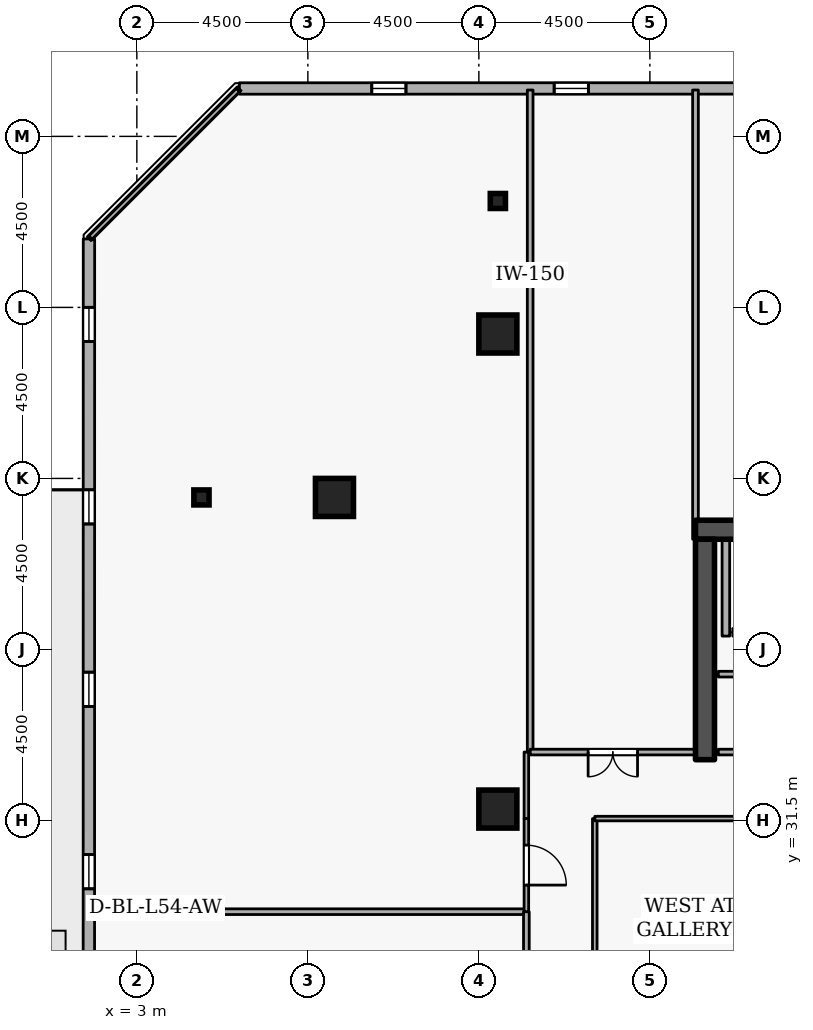
"""IFC4 building model, lengths in metres.
Left out: names, types, materials, properties, quantities, classifications, styles, units other than length and angle.
Written with IfcOpenShell. Run it as: python <this file> out.ifc"""

import sys

from ifc_helpers import new_model, si_unit, direction, frame, frame_2d, origin, origin_2d, place, context, subcontext, project, spatial, rectangle, i_section, extrude, element, fill, save


model = new_model("IFC4")
c1 = context("Model", 3, precision=1e-05, world=origin(), true_north=direction((0.0, 1.0)))
c2 = subcontext(c1, "Body", "Model", "MODEL_VIEW")
j1 = project(units=[si_unit("LENGTHUNIT", "METRE"), si_unit("PLANEANGLEUNIT", "RADIAN")], contexts=[c1])
p1 = place(None, origin())
s1 = spatial("IfcSite", under=j1, at=p1, CompositionType="ELEMENT")
p2 = place(p1, origin())
s2 = spatial("IfcBuilding", under=s1, at=p2, CompositionType="ELEMENT")
p3 = place(p2, frame((0.0, 0.0, 203.7)))
s3 = spatial("IfcBuildingStorey", under=s2, at=p3, CompositionType="ELEMENT", Elevation=203.7)
p4 = place(p3, frame((17.7, 39.15, 0.0), z_axis=(0.0, 0.0, 1.0), x_axis=(1.0, 0.0, 0.0)))
e1 = element("IfcWall", 1, at=p4, inside=s3, PredefinedType="SHEAR", context=c2, shape_type="SweptSolid", body=[
    extrude(rectangle(XDim=15.6, YDim=0.5, at=frame_2d((7.8, 0.0))), origin(), (0.0, 0.0, 1.0), 3.6),
])
p5 = place(p3, frame((17.95, 33.1, 0.0), z_axis=(0.0, 0.0, 1.0), x_axis=(0.0, 1.0, 0.0)))
e2 = element("IfcWall", 2, at=p5, inside=s3, PredefinedType="SHEAR", context=c2, shape_type="SweptSolid", body=[
    extrude(rectangle(XDim=5.8, YDim=0.5, at=frame_2d((2.9, 0.0))), origin(), (0.0, 0.0, 1.0), 3.6),
])
for number, where, z_axis, x_axis in (
    (3, (12.5, 44.3, 0.0), (0.0, 0.0, 1.0), (1.0, 0.0, 0.0)),
    (4, (8.2, 40.0, 0.0), (0.0, 0.0, 1.0), (1.0, 0.0, 0.0)),
    (5, (12.5, 31.8, 0.0), (0.0, 0.0, 1.0), (1.0, 0.0, 0.0)),
):
    element("IfcColumn", number, at=place(p3, frame(where, z_axis=z_axis, x_axis=x_axis)), inside=s3, PredefinedType="COLUMN", context=c2, shape_type="SweptSolid", body=[
        extrude(rectangle(XDim=1.0, YDim=1.0, at=origin_2d()), origin(), (0.0, 0.0, 1.0), 3.6),
    ])
for number, where, z_axis, x_axis in (
    (6, (12.5, 47.8, 0.0), (0.0, 0.0, 1.0), (1.0, 0.0, 0.0)),
    (7, (4.7, 40.0, 0.0), (0.0, 0.0, 1.0), (1.0, 0.0, 0.0)),
):
    element("IfcColumn", number, at=place(p3, frame(where, z_axis=z_axis, x_axis=x_axis)), inside=s3, PredefinedType="COLUMN", context=c2, shape_type="SweptSolid", body=[
        extrude(i_section(OverallWidth=0.399, OverallDepth=0.394, WebThickness=0.023, FlangeThickness=0.037, FilletRadius=0.015, at=origin_2d()), origin(), (0.0, 0.0, 1.0), 3.6),
    ])
p6 = place(p3, frame((40.681, 50.765, 0.0), z_axis=(0.0, 0.0, 1.0), x_axis=(-0.999999991209, -0.000132597301, 0.0)))
e8 = element("IfcWall", 8, at=p6, inside=s3, PredefinedType="STANDARD", context=c2, shape_type="SweptSolid", body=[
    extrude(rectangle(XDim=34.983, YDim=0.3, at=frame_2d((17.492, 0.0))), origin(), (0.0, 0.0, 1.0), 2.7),
])
p7 = place(p6, frame((1.8, 0.0, 0.72)))
e9 = element("IfcOpeningElement", 9, at=p7, cuts=e8, PredefinedType="OPENING", context=c2, shape_type="SweptSolid", body=[
    extrude(rectangle(XDim=0.9, YDim=1.75, at=frame_2d((0.45, 0.875))), frame((0.0, 0.16, 0.0), z_axis=(0.0, -1.0, 0.0), x_axis=(1.0, 0.0, 0.0)), (0.0, 0.0, 1.0), 0.32),
])
p8 = place(p6, frame((6.6, 0.0, 0.72)))
e10 = element("IfcOpeningElement", 10, at=p8, cuts=e8, PredefinedType="OPENING", context=c2, shape_type="SweptSolid", body=[
    extrude(rectangle(XDim=0.9, YDim=1.75, at=frame_2d((0.45, 0.875))), frame((0.0, 0.16, 0.0), z_axis=(0.0, -1.0, 0.0), x_axis=(1.0, 0.0, 0.0)), (0.0, 0.0, 1.0), 0.32),
])
p9 = place(p6, frame((11.4, 0.0, 0.72)))
e11 = element("IfcOpeningElement", 11, at=p9, cuts=e8, PredefinedType="OPENING", context=c2, shape_type="SweptSolid", body=[
    extrude(rectangle(XDim=0.9, YDim=1.75, at=frame_2d((0.45, 0.875))), frame((0.0, 0.16, 0.0), z_axis=(0.0, -1.0, 0.0), x_axis=(1.0, 0.0, 0.0)), (0.0, 0.0, 1.0), 0.32),
])
p10 = place(p6, frame((16.2, 0.0, 0.72)))
e12 = element("IfcOpeningElement", 12, at=p10, cuts=e8, PredefinedType="OPENING", context=c2, shape_type="SweptSolid", body=[
    extrude(rectangle(XDim=0.9, YDim=1.75, at=frame_2d((0.45, 0.875))), frame((0.0, 0.16, 0.0), z_axis=(0.0, -1.0, 0.0), x_axis=(1.0, 0.0, 0.0)), (0.0, 0.0, 1.0), 0.32),
])
p11 = place(p6, frame((21.0, 0.0, 0.72)))
e13 = element("IfcOpeningElement", 13, at=p11, cuts=e8, PredefinedType="OPENING", context=c2, shape_type="SweptSolid", body=[
    extrude(rectangle(XDim=0.9, YDim=1.75, at=frame_2d((0.45, 0.875))), frame((0.0, 0.16, 0.0), z_axis=(0.0, -1.0, 0.0), x_axis=(1.0, 0.0, 0.0)), (0.0, 0.0, 1.0), 0.32),
])
p12 = place(p6, frame((25.8, 0.0, 0.72)))
e14 = element("IfcOpeningElement", 14, at=p12, cuts=e8, PredefinedType="OPENING", context=c2, shape_type="SweptSolid", body=[
    extrude(rectangle(XDim=0.9, YDim=1.75, at=frame_2d((0.45, 0.875))), frame((0.0, 0.16, 0.0), z_axis=(0.0, -1.0, 0.0), x_axis=(1.0, 0.0, 0.0)), (0.0, 0.0, 1.0), 0.32),
])
p13 = place(p6, frame((30.6, 0.0, 0.72)))
e15 = element("IfcOpeningElement", 15, at=p13, cuts=e8, PredefinedType="OPENING", context=c2, shape_type="SweptSolid", body=[
    extrude(rectangle(XDim=0.9, YDim=1.75, at=frame_2d((0.45, 0.875))), frame((0.0, 0.16, 0.0), z_axis=(0.0, -1.0, 0.0), x_axis=(1.0, 0.0, 0.0)), (0.0, 0.0, 1.0), 0.32),
])
p14 = place(p3, frame((1.74, 46.802, 0.0), z_axis=(0.0, 0.0, 1.0), x_axis=(-0.000132597301, -0.999999991209, 0.0)))
e16 = element("IfcWall", 16, at=p14, inside=s3, PredefinedType="STANDARD", context=c2, shape_type="SweptSolid", body=[
    extrude(rectangle(XDim=34.983, YDim=0.3, at=frame_2d((17.492, 0.0))), origin(), (0.0, 0.0, 1.0), 2.7),
])
p15 = place(p14, frame((19.292, 0.0, 0.0)))
e17 = element("IfcOpeningElement", 17, at=p15, cuts=e16, PredefinedType="OPENING", context=c2, shape_type="SweptSolid", body=[
    extrude(rectangle(XDim=1.0, YDim=2.08, at=frame_2d((0.5, 1.04))), frame((0.0, 0.16, 0.0), z_axis=(0.0, -1.0, 0.0), x_axis=(1.0, 0.0, 0.0)), (0.0, 0.0, 1.0), 0.32),
])
p16 = place(p14, frame((1.8, 0.0, 0.72)))
e18 = element("IfcOpeningElement", 18, at=p16, cuts=e16, PredefinedType="OPENING", context=c2, shape_type="SweptSolid", body=[
    extrude(rectangle(XDim=0.9, YDim=1.75, at=frame_2d((0.45, 0.875))), frame((0.0, 0.16, 0.0), z_axis=(0.0, -1.0, 0.0), x_axis=(1.0, 0.0, 0.0)), (0.0, 0.0, 1.0), 0.32),
])
p17 = place(p14, frame((6.6, 0.0, 0.72)))
e19 = element("IfcOpeningElement", 19, at=p17, cuts=e16, PredefinedType="OPENING", context=c2, shape_type="SweptSolid", body=[
    extrude(rectangle(XDim=0.9, YDim=1.75, at=frame_2d((0.45, 0.875))), frame((0.0, 0.16, 0.0), z_axis=(0.0, -1.0, 0.0), x_axis=(1.0, 0.0, 0.0)), (0.0, 0.0, 1.0), 0.32),
])
p18 = place(p14, frame((11.4, 0.0, 0.72)))
e20 = element("IfcOpeningElement", 20, at=p18, cuts=e16, PredefinedType="OPENING", context=c2, shape_type="SweptSolid", body=[
    extrude(rectangle(XDim=0.9, YDim=1.75, at=frame_2d((0.45, 0.875))), frame((0.0, 0.16, 0.0), z_axis=(0.0, -1.0, 0.0), x_axis=(1.0, 0.0, 0.0)), (0.0, 0.0, 1.0), 0.32),
])
p19 = place(p14, frame((16.2, 0.0, 0.72)))
e21 = element("IfcOpeningElement", 21, at=p19, cuts=e16, PredefinedType="OPENING", context=c2, shape_type="SweptSolid", body=[
    extrude(rectangle(XDim=0.9, YDim=1.75, at=frame_2d((0.45, 0.875))), frame((0.0, 0.16, 0.0), z_axis=(0.0, -1.0, 0.0), x_axis=(1.0, 0.0, 0.0)), (0.0, 0.0, 1.0), 0.32),
])
p20 = place(p14, frame((25.8, 0.0, 0.72)))
e22 = element("IfcOpeningElement", 22, at=p20, cuts=e16, PredefinedType="OPENING", context=c2, shape_type="SweptSolid", body=[
    extrude(rectangle(XDim=0.9, YDim=1.75, at=frame_2d((0.45, 0.875))), frame((0.0, 0.16, 0.0), z_axis=(0.0, -1.0, 0.0), x_axis=(1.0, 0.0, 0.0)), (0.0, 0.0, 1.0), 0.32),
])
p21 = place(p14, frame((30.6, 0.0, 0.72)))
e23 = element("IfcOpeningElement", 23, at=p21, cuts=e16, PredefinedType="OPENING", context=c2, shape_type="SweptSolid", body=[
    extrude(rectangle(XDim=0.9, YDim=1.75, at=frame_2d((0.45, 0.875))), frame((0.0, 0.16, 0.0), z_axis=(0.0, -1.0, 0.0), x_axis=(1.0, 0.0, 0.0)), (0.0, 0.0, 1.0), 0.32),
])
p22 = place(p3, frame((20.62, 36.45, 0.0), z_axis=(0.0, 0.0, 1.0), x_axis=(-1.0, 0.0, 0.0)))
e24 = element("IfcWall", 24, at=p22, inside=s3, PredefinedType="STANDARD", context=c2, shape_type="SweptSolid", body=[
    extrude(rectangle(XDim=1.94, YDim=0.2, at=frame_2d((0.97, 0.0))), origin(), (0.0, 0.0, 1.0), 3.34),
])
p23 = place(p22, frame((0.46, 0.0, 0.0)))
e25 = element("IfcOpeningElement", 25, at=p23, cuts=e24, PredefinedType="OPENING", context=c2, shape_type="SweptSolid", body=[
    extrude(rectangle(XDim=1.02, YDim=2.06, at=frame_2d((0.51, 1.03))), frame((0.0, 0.11, 0.0), z_axis=(0.0, -1.0, 0.0), x_axis=(1.0, 0.0, 0.0)), (0.0, 0.0, 1.0), 0.22),
])
p24 = place(p3, frame((18.5, 36.352, 0.0), z_axis=(0.0, 0.0, 1.0), x_axis=(0.0, 1.0, 0.0)))
e26 = element("IfcWall", 26, at=p24, inside=s3, PredefinedType="STANDARD", context=c2, shape_type="SweptSolid", body=[
    extrude(rectangle(XDim=2.536, YDim=0.2, at=frame_2d((1.268, 0.0))), origin(), (0.0, 0.0, 1.0), 3.34),
])
p25 = place(p3, frame((18.3, 33.3, 0.0), z_axis=(0.0, 0.0, 1.0), x_axis=(1.0, 0.0, 0.0)))
e27 = element("IfcWall", 27, at=p25, inside=s3, PredefinedType="PARTITIONING", context=c2, shape_type="SweptSolid", body=[
    extrude(rectangle(XDim=3.3, YDim=0.15, at=frame_2d((1.65, 0.0))), origin(), (0.0, 0.0, 1.0), 3.34),
])
p26 = place(p25, frame((1.19, 0.0, 0.0)))
e28 = element("IfcOpeningElement", 28, at=p26, cuts=e27, PredefinedType="OPENING", context=c2, shape_type="SweptSolid", body=[
    extrude(rectangle(XDim=0.92, YDim=2.08, at=frame_2d((0.46, 1.04))), frame((0.0, 0.085, 0.0), z_axis=(0.0, -1.0, 0.0), x_axis=(1.0, 0.0, 0.0)), (0.0, 0.0, 1.0), 0.17),
])
p27 = place(p3, frame((21.6, 35.35, 0.0), z_axis=(0.0, 0.0, 1.0), x_axis=(-1.0, 0.0, 0.0)))
e29 = element("IfcWall", 29, at=p27, inside=s3, PredefinedType="PARTITIONING", context=c2, shape_type="SweptSolid", body=[
    extrude(rectangle(XDim=3.3, YDim=0.15, at=frame_2d((1.65, 0.0))), origin(), (0.0, 0.0, 1.0), 3.34),
])
p28 = place(p3, frame((13.35, 33.3, 0.0), z_axis=(0.0, 0.0, 1.0), x_axis=(0.0, 1.0, 0.0)))
e30 = element("IfcWall", 30, at=p28, inside=s3, PredefinedType="PARTITIONING", context=c2, shape_type="SweptSolid", body=[
    extrude(rectangle(XDim=17.42, YDim=0.15, at=frame_2d((8.71, 0.0))), origin(), (0.0, 0.0, 1.0), 3.34),
])
p29 = place(p3, frame((17.7, 50.72, 0.0), z_axis=(0.0, 0.0, 1.0), x_axis=(0.0, -1.0, 0.0)))
e31 = element("IfcWall", 31, at=p29, inside=s3, PredefinedType="PARTITIONING", context=c2, shape_type="SweptSolid", body=[
    extrude(rectangle(XDim=11.82, YDim=0.15, at=frame_2d((5.91, 0.0))), origin(), (0.0, 0.0, 1.0), 2.545),
])
p30 = place(p3, frame((17.7, 33.3, 0.0), z_axis=(0.0, 0.0, 1.0), x_axis=(-1.0, 0.0, 0.0)))
e32 = element("IfcWall", 32, at=p30, inside=s3, PredefinedType="PARTITIONING", context=c2, shape_type="SweptSolid", body=[
    extrude(rectangle(XDim=4.35, YDim=0.15, at=frame_2d((2.175, 0.0))), origin(), (0.0, 0.0, 1.0), 3.34),
])
p31 = place(p30, frame((1.525, 0.0, 0.0)))
e33 = element("IfcOpeningElement", 33, at=p31, cuts=e32, PredefinedType="OPENING", context=c2, shape_type="SweptSolid", body=[
    extrude(rectangle(XDim=1.3, YDim=2.12, at=frame_2d((0.65, 1.06))), frame((0.0, 0.085, 0.0), z_axis=(0.0, -1.0, 0.0), x_axis=(1.0, 0.0, 0.0)), (0.0, 0.0, 1.0), 0.17),
])
p32 = place(p3, frame((1.78, 29.1, 0.0), z_axis=(0.0, 0.0, 1.0), x_axis=(1.0, 0.0, 0.0)))
e34 = element("IfcWall", 34, at=p32, inside=s3, PredefinedType="PARTITIONING", context=c2, shape_type="SweptSolid", body=[
    extrude(rectangle(XDim=11.47, YDim=0.15, at=frame_2d((5.735, 0.0))), origin(), (0.0, 0.0, 1.0), 3.34),
])
p33 = place(p3, frame((13.25, 29.1, 0.0), z_axis=(0.0, 0.0, 1.0), x_axis=(0.0, -1.0, 0.0)))
e35 = element("IfcWall", 35, at=p33, inside=s3, PredefinedType="PARTITIONING", context=c2, shape_type="SweptSolid", body=[
    extrude(rectangle(XDim=4.2, YDim=0.15, at=frame_2d((2.1, 0.0))), origin(), (0.0, 0.0, 1.0), 3.34),
])
p34 = place(p33, frame((1.45, 0.0, 0.0)))
e36 = element("IfcOpeningElement", 36, at=p34, cuts=e35, PredefinedType="OPENING", context=c2, shape_type="SweptSolid", body=[
    extrude(rectangle(XDim=1.3, YDim=2.12, at=frame_2d((0.65, 1.06))), frame((0.0, 0.085, 0.0), z_axis=(0.0, -1.0, 0.0), x_axis=(1.0, 0.0, 0.0)), (0.0, 0.0, 1.0), 0.17),
])
p35 = place(p3, frame((1.78, 46.84, 0.0), z_axis=(0.0, 0.0, 1.0), x_axis=(0.707106781187, 0.707106781187, 0.0)))
e37 = element("IfcWall", 37, at=p35, inside=s3, PredefinedType="PARTITIONING", context=c2, shape_type="SweptSolid", body=[
    extrude(rectangle(XDim=5.487, YDim=0.12, at=frame_2d((2.743, 0.0))), origin(), (0.0, 0.0, 1.0), 3.34),
])
p36 = place(p3, frame((13.25, 33.3, 0.0), z_axis=(0.0, 0.0, 1.0), x_axis=(0.0, -1.0, 0.0)))
e38 = element("IfcWall", 38, at=p36, inside=s3, PredefinedType="PARTITIONING", context=c2, shape_type="SweptSolid", body=[
    extrude(rectangle(XDim=1.75, YDim=0.12, at=frame_2d((0.875, 0.0))), origin(), (0.0, 0.0, 1.0), 3.34),
])
p37 = place(p3, frame((13.25, 31.55, 0.0), z_axis=(0.0, 0.0, 1.0), x_axis=(0.0, -1.0, 0.0)))
e39 = element("IfcWall", 39, at=p37, inside=s3, PredefinedType="PARTITIONING", context=c2, shape_type="SweptSolid", body=[
    extrude(rectangle(XDim=2.45, YDim=0.12, at=frame_2d((1.225, 0.0))), origin(), (0.0, 0.0, 1.0), 3.34),
])
p38 = place(p37, frame((0.7, 0.0, 0.0)))
e40 = element("IfcOpeningElement", 40, at=p38, cuts=e39, PredefinedType="OPENING", context=c2, shape_type="SweptSolid", body=[
    extrude(rectangle(XDim=1.05, YDim=2.1, at=frame_2d((0.525, 1.05))), frame((0.0, 0.07, 0.0), z_axis=(0.0, -1.0, 0.0), x_axis=(1.0, 0.0, 0.0)), (0.0, 0.0, 1.0), 0.14),
])
p39 = place(p3, frame((15.05, 22.45, 0.0), z_axis=(0.0, 0.0, 1.0), x_axis=(0.0, 1.0, 0.0)))
e41 = element("IfcWall", 41, at=p39, inside=s3, PredefinedType="PARTITIONING", context=c2, shape_type="SweptSolid", body=[
    extrude(rectangle(XDim=9.1, YDim=0.12, at=frame_2d((4.55, 0.0))), origin(), (0.0, 0.0, 1.0), 3.34),
])
p40 = place(p39, frame((4.075, 0.0, 0.0)))
e42 = element("IfcOpeningElement", 42, at=p40, cuts=e41, PredefinedType="OPENING", context=c2, shape_type="SweptSolid", body=[
    extrude(rectangle(XDim=0.95, YDim=2.1, at=frame_2d((0.475, 1.05))), frame((0.0, 0.07, 0.0), z_axis=(0.0, -1.0, 0.0), x_axis=(1.0, 0.0, 0.0)), (0.0, 0.0, 1.0), 0.14),
])
p41 = place(p3, frame((15.05, 31.55, 0.0), z_axis=(0.0, 0.0, 1.0), x_axis=(1.0, 0.0, 0.0)))
e43 = element("IfcWall", 43, at=p41, inside=s3, PredefinedType="PARTITIONING", context=c2, shape_type="SweptSolid", body=[
    extrude(rectangle(XDim=5.85, YDim=0.12, at=frame_2d((2.925, 0.0))), origin(), (0.0, 0.0, 1.0), 3.34),
])
p42 = place(p12, origin())
e44 = element("IfcWindow", 44, at=p42, inside=s3, PartitioningType="SINGLE_PANEL", PredefinedType="WINDOW", context=c2, shape_type="SweptSolid", body=[
    extrude(rectangle(XDim=0.9, YDim=1.75, at=frame_2d((0.45, 0.875))), frame((0.0, 0.03, 0.0), z_axis=(0.0, -1.0, 0.0), x_axis=(1.0, 0.0, 0.0)), (0.0, 0.0, 1.0), 0.06),
])
fill(e14, e44)
p43 = place(p13, origin())
e45 = element("IfcWindow", 45, at=p43, inside=s3, PartitioningType="SINGLE_PANEL", PredefinedType="WINDOW", context=c2, shape_type="SweptSolid", body=[
    extrude(rectangle(XDim=0.9, YDim=1.75, at=frame_2d((0.45, 0.875))), frame((0.0, 0.03, 0.0), z_axis=(0.0, -1.0, 0.0), x_axis=(1.0, 0.0, 0.0)), (0.0, 0.0, 1.0), 0.06),
])
fill(e15, e45)
p44 = place(p16, origin())
e46 = element("IfcWindow", 46, at=p44, inside=s3, PartitioningType="SINGLE_PANEL", PredefinedType="WINDOW", context=c2, shape_type="SweptSolid", body=[
    extrude(rectangle(XDim=0.9, YDim=1.75, at=frame_2d((0.45, 0.875))), frame((0.0, 0.03, 0.0), z_axis=(0.0, -1.0, 0.0), x_axis=(1.0, 0.0, 0.0)), (0.0, 0.0, 1.0), 0.06),
])
fill(e18, e46)
p45 = place(p17, origin())
e47 = element("IfcWindow", 47, at=p45, inside=s3, PartitioningType="SINGLE_PANEL", PredefinedType="WINDOW", context=c2, shape_type="SweptSolid", body=[
    extrude(rectangle(XDim=0.9, YDim=1.75, at=frame_2d((0.45, 0.875))), frame((0.0, 0.03, 0.0), z_axis=(0.0, -1.0, 0.0), x_axis=(1.0, 0.0, 0.0)), (0.0, 0.0, 1.0), 0.06),
])
fill(e19, e47)
p46 = place(p18, origin())
e48 = element("IfcWindow", 48, at=p46, inside=s3, PartitioningType="SINGLE_PANEL", PredefinedType="WINDOW", context=c2, shape_type="SweptSolid", body=[
    extrude(rectangle(XDim=0.9, YDim=1.75, at=frame_2d((0.45, 0.875))), frame((0.0, 0.03, 0.0), z_axis=(0.0, -1.0, 0.0), x_axis=(1.0, 0.0, 0.0)), (0.0, 0.0, 1.0), 0.06),
])
fill(e20, e48)
p47 = place(p19, origin())
e49 = element("IfcWindow", 49, at=p47, inside=s3, PartitioningType="SINGLE_PANEL", PredefinedType="WINDOW", context=c2, shape_type="SweptSolid", body=[
    extrude(rectangle(XDim=0.9, YDim=1.75, at=frame_2d((0.45, 0.875))), frame((0.0, 0.03, 0.0), z_axis=(0.0, -1.0, 0.0), x_axis=(1.0, 0.0, 0.0)), (0.0, 0.0, 1.0), 0.06),
])
fill(e21, e49)
p48 = place(p31, origin())
e50 = element("IfcDoor", 50, at=p48, inside=s3, OperationType="DOUBLE_DOOR_SINGLE_SWING", PredefinedType="DOOR", context=c2, shape_type="SweptSolid", body=[
    extrude(rectangle(XDim=1.3, YDim=2.12, at=frame_2d((0.65, 1.06))), frame((0.0, 0.025, 0.0), z_axis=(0.0, -1.0, 0.0), x_axis=(1.0, 0.0, 0.0)), (0.0, 0.0, 1.0), 0.05),
])
fill(e33, e50)
p49 = place(p38, origin())
e51 = element("IfcDoor", 51, at=p49, inside=s3, OperationType="SINGLE_SWING_RIGHT", PredefinedType="DOOR", context=c2, shape_type="SweptSolid", body=[
    extrude(rectangle(XDim=1.05, YDim=2.1, at=frame_2d((0.525, 1.05))), frame((0.0, 0.025, 0.0), z_axis=(0.0, -1.0, 0.0), x_axis=(1.0, 0.0, 0.0)), (0.0, 0.0, 1.0), 0.05),
])
fill(e40, e51)
save(model, sys.argv[1])
